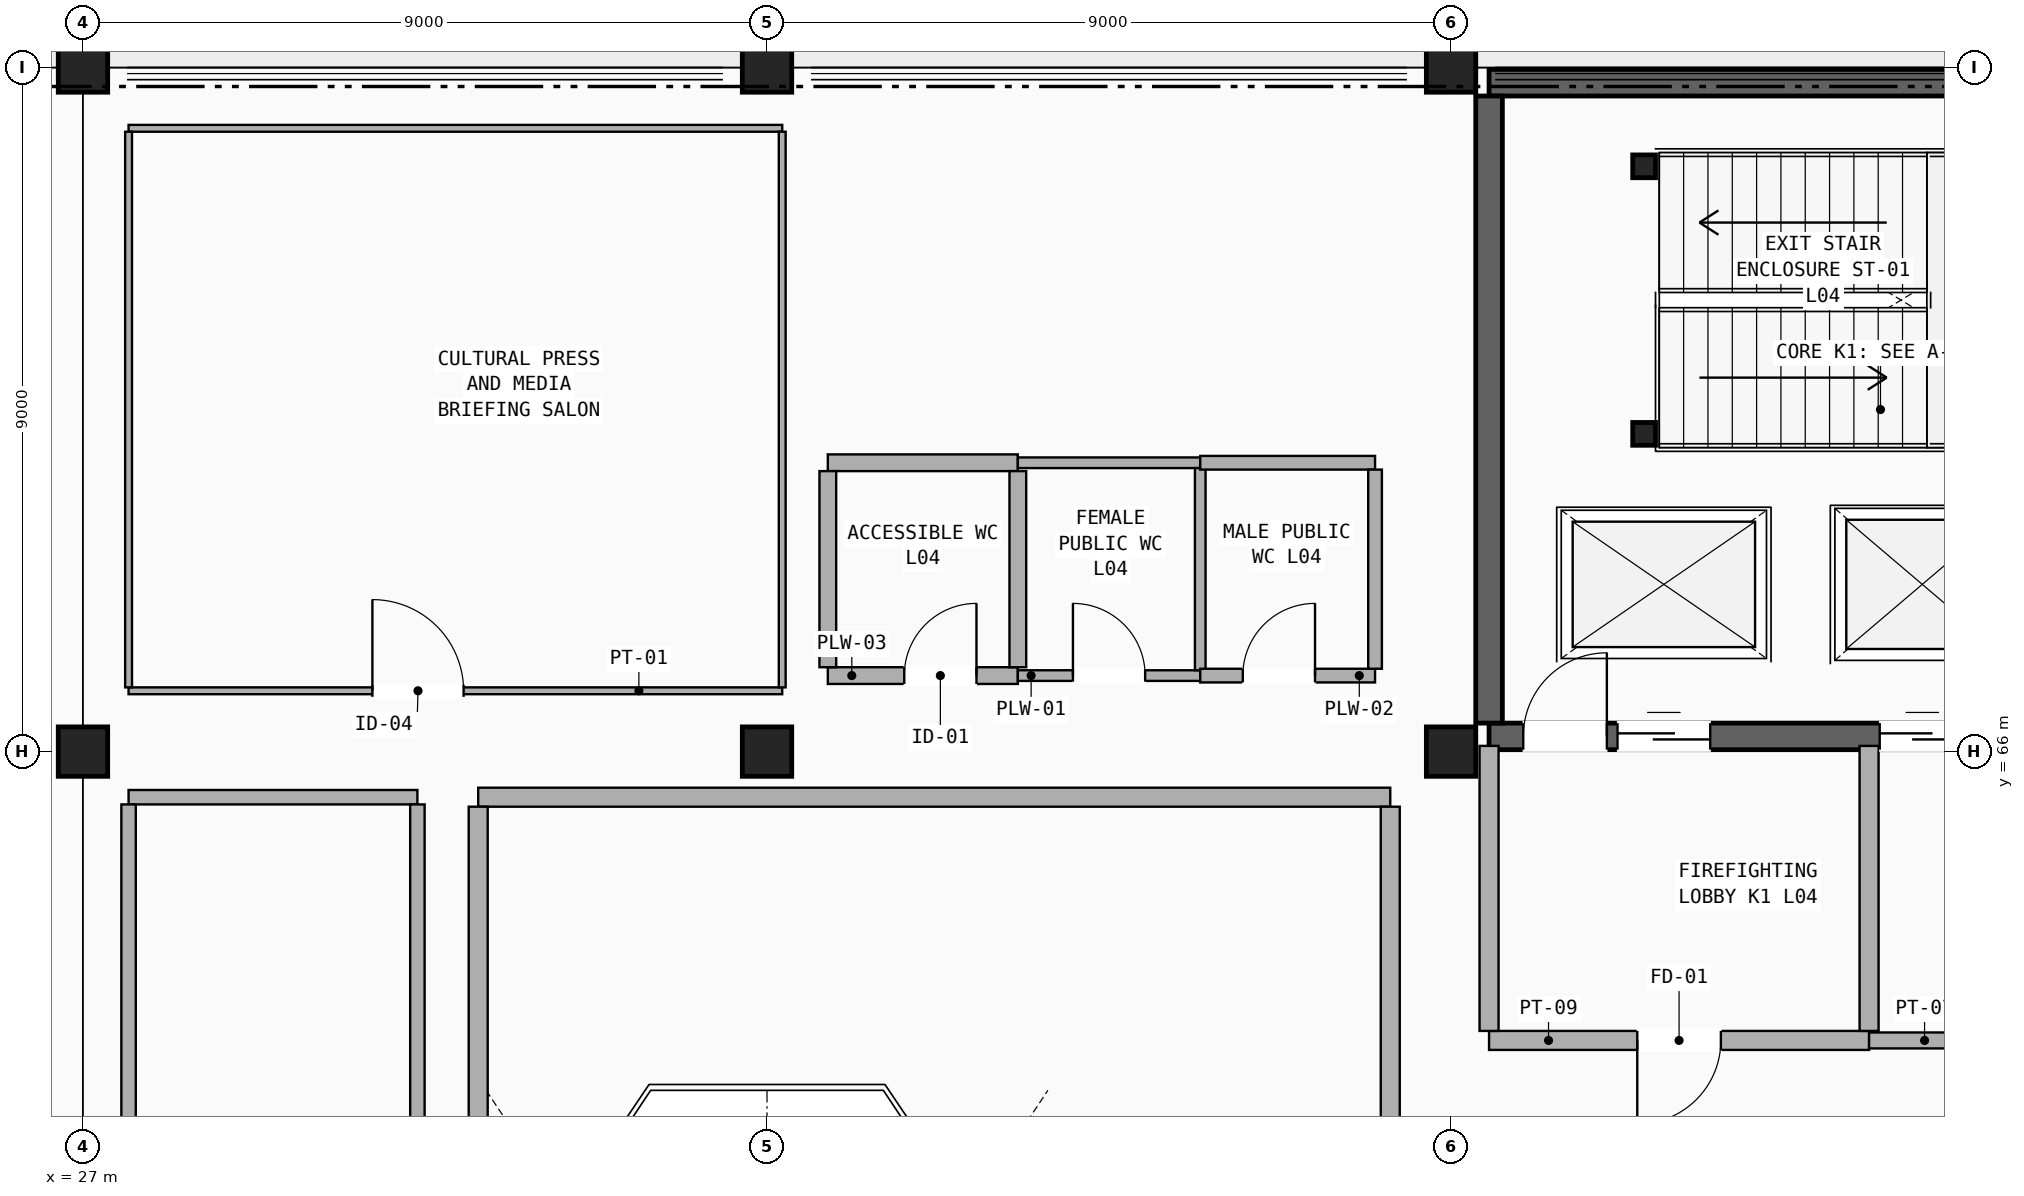
"""IFC4 building model, lengths in metres.
Left out: names, types, materials, properties, quantities, classifications, styles, units other than length and angle.
Written with IfcOpenShell. Run it as: python <this file> out.ifc"""

import sys

from ifc_helpers import new_model, si_unit, direction, frame, frame_2d, origin, origin_2d, place, context, subcontext, project, spatial, rectangle, hollow_rectangle, extrude, element, fill, save


model = new_model("IFC4")
c1 = context("Model", 3, precision=1e-05, world=origin(), true_north=direction((0.0, 1.0)))
c2 = subcontext(c1, "Body", "Model", "MODEL_VIEW")
j1 = project(units=[si_unit("LENGTHUNIT", "METRE"), si_unit("PLANEANGLEUNIT", "RADIAN")], contexts=[c1])
p1 = place(None, origin())
s1 = spatial("IfcSite", under=j1, at=p1, CompositionType="ELEMENT")
p2 = place(p1, origin())
s2 = spatial("IfcBuilding", under=s1, at=p2, CompositionType="ELEMENT")
p3 = place(p2, frame((0.0, 0.0, 17.68)))
s3 = spatial("IfcBuildingStorey", under=s2, at=p3, CompositionType="ELEMENT", Elevation=17.68)
for number, where, z_axis, x_axis in (
    (1, (27.0, 66.0, 0.0), (0.0, 0.0, 1.0), (1.0, 0.0, 0.0)),
    (2, (27.0, 75.0, 0.0), (0.0, 0.0, 1.0), (1.0, 0.0, 0.0)),
    (3, (36.0, 66.0, 0.0), (0.0, 0.0, 1.0), (1.0, 0.0, 0.0)),
    (4, (36.0, 75.0, 0.0), (0.0, 0.0, 1.0), (1.0, 0.0, 0.0)),
    (5, (45.0, 66.0, 0.0), (0.0, 0.0, 1.0), (1.0, 0.0, 0.0)),
    (6, (45.0, 75.0, 0.0), (0.0, 0.0, 1.0), (1.0, 0.0, 0.0)),
):
    element("IfcColumn", number, at=place(p3, frame(where, z_axis=z_axis, x_axis=x_axis)), inside=s3, PredefinedType="COLUMN", context=c2, shape_type="SweptSolid", body=[
        extrude(rectangle(XDim=0.65, YDim=0.65, at=origin_2d()), origin(), (0.0, 0.0, 1.0), 4.08),
    ])
p4 = place(p3, frame((45.5, 66.2, 0.0), z_axis=(0.0, 0.0, 1.0), x_axis=(1.0, 0.0, 0.0)))
e7 = element("IfcWall", 7, at=p4, inside=s3, PredefinedType="SHEAR", context=c2, shape_type="SweptSolid", body=[
    extrude(rectangle(XDim=10.3, YDim=0.35, at=frame_2d((5.15, 0.0))), origin(), (0.0, 0.0, 1.0), 4.08),
])
p5 = place(p4, frame((0.45, 0.0, 0.0)))
e8 = element("IfcOpeningElement", 8, at=p5, cuts=e7, PredefinedType="OPENING", context=c2, shape_type="SweptSolid", body=[
    extrude(rectangle(XDim=1.1, YDim=2.2, at=frame_2d((0.55, 1.1))), frame((0.0, 0.185, 0.0), z_axis=(0.0, -1.0, 0.0), x_axis=(1.0, 0.0, 0.0)), (0.0, 0.0, 1.0), 0.37),
])
p6 = place(p4, frame((1.69, 0.0, 0.0)))
e9 = element("IfcOpeningElement", 9, at=p6, cuts=e7, PredefinedType="OPENING", context=c2, shape_type="SweptSolid", body=[
    extrude(rectangle(XDim=1.22, YDim=2.2, at=frame_2d((0.61, 1.1))), frame((0.0, 0.185, 0.0), z_axis=(0.0, -1.0, 0.0), x_axis=(1.0, 0.0, 0.0)), (0.0, 0.0, 1.0), 0.37),
])
p7 = place(p4, frame((5.14, 0.0, 0.0)))
e10 = element("IfcOpeningElement", 10, at=p7, cuts=e7, PredefinedType="OPENING", context=c2, shape_type="SweptSolid", body=[
    extrude(rectangle(XDim=1.12, YDim=2.16, at=frame_2d((0.56, 1.08))), frame((0.0, 0.185, 0.0), z_axis=(0.0, -1.0, 0.0), x_axis=(1.0, 0.0, 0.0)), (0.0, 0.0, 1.0), 0.37),
])
p8 = place(p3, frame((45.5, 74.8, 0.0), z_axis=(0.0, 0.0, 1.0), x_axis=(1.0, 0.0, 0.0)))
e11 = element("IfcWall", 11, at=p8, inside=s3, PredefinedType="SHEAR", context=c2, shape_type="SweptSolid", body=[
    extrude(rectangle(XDim=10.3, YDim=0.35, at=frame_2d((5.15, 0.0))), origin(), (0.0, 0.0, 1.0), 4.08),
])
p9 = place(p3, frame((45.5, 66.375, 0.0), z_axis=(0.0, 0.0, 1.0), x_axis=(0.0, 1.0, 0.0)))
e12 = element("IfcWall", 12, at=p9, inside=s3, PredefinedType="SHEAR", context=c2, shape_type="SweptSolid", body=[
    extrude(rectangle(XDim=8.25, YDim=0.35, at=frame_2d((4.125, 0.0))), origin(), (0.0, 0.0, 1.0), 4.08),
])
for number, where, z_axis, x_axis in (
    (13, (47.54, 70.18, 0.0), (0.0, 0.0, 1.0), (1.0, 0.0, 0.0)),
    (14, (47.54, 73.7, 0.0), (0.0, 0.0, 1.0), (1.0, 0.0, 0.0)),
):
    element("IfcColumn", number, at=place(p3, frame(where, z_axis=z_axis, x_axis=x_axis)), inside=s3, PredefinedType="COLUMN", context=c2, shape_type="SweptSolid", body=[
        extrude(hollow_rectangle(XDim=0.3, YDim=0.3, WallThickness=0.016, InnerFilletRadius=0.016, OuterFilletRadius=0.032, at=origin_2d()), origin(), (0.0, 0.0, 1.0), 4.08),
    ])
p10 = place(p3, frame((45.5, 62.2, 0.0), z_axis=(0.0, 0.0, 1.0), x_axis=(1.0, 0.0, 0.0)))
e15 = element("IfcWall", 15, at=p10, inside=s3, PredefinedType="PARTITIONING", context=c2, shape_type="SweptSolid", body=[
    extrude(rectangle(XDim=5.0, YDim=0.25, at=frame_2d((2.5, 0.0))), origin(), (0.0, 0.0, 1.0), 3.84),
])
p11 = place(p10, frame((1.95, 0.0, 0.0)))
e16 = element("IfcOpeningElement", 16, at=p11, cuts=e15, PredefinedType="OPENING", context=c2, shape_type="SweptSolid", body=[
    extrude(rectangle(XDim=1.1, YDim=2.2, at=frame_2d((0.55, 1.1))), frame((0.0, 0.135, 0.0), z_axis=(0.0, -1.0, 0.0), x_axis=(1.0, 0.0, 0.0)), (0.0, 0.0, 1.0), 0.27),
])
for number, where, z_axis, x_axis in (
    (17, (45.5, 62.325, 0.0), (0.0, 0.0, 1.0), (0.0, 1.0, 0.0)),
    (18, (50.5, 62.325, 0.0), (0.0, 0.0, 1.0), (0.0, 1.0, 0.0)),
):
    element("IfcWall", number, at=place(p3, frame(where, z_axis=z_axis, x_axis=x_axis)), inside=s3, PredefinedType="PARTITIONING", context=c2, shape_type="SweptSolid", body=[
        extrude(rectangle(XDim=3.75, YDim=0.25, at=frame_2d((1.875, 0.0))), origin(), (0.0, 0.0, 1.0), 3.07),
    ])
p12 = place(p3, frame((50.5, 62.2, 0.0), z_axis=(0.0, 0.0, 1.0), x_axis=(1.0, 0.0, 0.0)))
e19 = element("IfcWall", 19, at=p12, inside=s3, PredefinedType="PARTITIONING", context=c2, shape_type="SweptSolid", body=[
    extrude(rectangle(XDim=5.3, YDim=0.21, at=frame_2d((2.65, 0.0))), origin(), (0.0, 0.0, 1.0), 2.97),
])
p13 = place(p12, frame((1.95, 0.0, 0.0)))
e20 = element("IfcOpeningElement", 20, at=p13, cuts=e19, PredefinedType="OPENING", context=c2, shape_type="SweptSolid", body=[
    extrude(rectangle(XDim=1.4, YDim=2.2, at=frame_2d((0.7, 1.1))), frame((0.0, 0.115, 0.0), z_axis=(0.0, -1.0, 0.0), x_axis=(1.0, 0.0, 0.0)), (0.0, 0.0, 1.0), 0.23),
])
p14 = place(p3, frame((36.8, 67.0, 0.0), z_axis=(0.0, 0.0, 1.0), x_axis=(1.0, 0.0, 0.0)))
e21 = element("IfcWall", 21, at=p14, inside=s3, PredefinedType="PLUMBINGWALL", context=c2, shape_type="SweptSolid", body=[
    extrude(rectangle(XDim=2.5, YDim=0.22, at=frame_2d((1.25, 0.0))), origin(), (0.0, 0.0, 1.0), 3.84),
])
p15 = place(p14, frame((1.006, 0.0, 0.0)))
e22 = element("IfcOpeningElement", 22, at=p15, cuts=e21, PredefinedType="OPENING", context=c2, shape_type="SweptSolid", body=[
    extrude(rectangle(XDim=0.95, YDim=2.15, at=frame_2d((0.475, 1.075))), frame((0.0, 0.12, 0.0), z_axis=(0.0, -1.0, 0.0), x_axis=(1.0, 0.0, 0.0)), (0.0, 0.0, 1.0), 0.24),
])
p16 = place(p3, frame((36.8, 69.8, 0.0), z_axis=(0.0, 0.0, 1.0), x_axis=(1.0, 0.0, 0.0)))
e23 = element("IfcWall", 23, at=p16, inside=s3, PredefinedType="PLUMBINGWALL", context=c2, shape_type="SweptSolid", body=[
    extrude(rectangle(XDim=2.5, YDim=0.22, at=frame_2d((1.25, 0.0))), origin(), (0.0, 0.0, 1.0), 3.84),
])
for number, where, z_axis, x_axis in (
    (24, (36.8, 67.11, 0.0), (0.0, 0.0, 1.0), (0.0, 1.0, 0.0)),
    (25, (39.3, 67.11, 0.0), (0.0, 0.0, 1.0), (0.0, 1.0, 0.0)),
):
    element("IfcWall", number, at=place(p3, frame(where, z_axis=z_axis, x_axis=x_axis)), inside=s3, PredefinedType="PLUMBINGWALL", context=c2, shape_type="SweptSolid", body=[
        extrude(rectangle(XDim=2.58, YDim=0.22, at=frame_2d((1.29, 0.0))), origin(), (0.0, 0.0, 1.0), 3.84),
    ])
p17 = place(p3, frame((39.3, 67.0, 0.0), z_axis=(0.0, 0.0, 1.0), x_axis=(1.0, 0.0, 0.0)))
e26 = element("IfcWall", 26, at=p17, inside=s3, PredefinedType="PLUMBINGWALL", context=c2, shape_type="SweptSolid", body=[
    extrude(rectangle(XDim=2.4, YDim=0.14, at=frame_2d((1.2, 0.0))), origin(), (0.0, 0.0, 1.0), 3.84),
])
p18 = place(p17, frame((0.725, 0.0, 0.0)))
e27 = element("IfcOpeningElement", 27, at=p18, cuts=e26, PredefinedType="OPENING", context=c2, shape_type="SweptSolid", body=[
    extrude(rectangle(XDim=0.95, YDim=2.15, at=frame_2d((0.475, 1.075))), frame((0.0, 0.08, 0.0), z_axis=(0.0, -1.0, 0.0), x_axis=(1.0, 0.0, 0.0)), (0.0, 0.0, 1.0), 0.16),
])
p19 = place(p3, frame((39.3, 69.8, 0.0), z_axis=(0.0, 0.0, 1.0), x_axis=(1.0, 0.0, 0.0)))
e28 = element("IfcWall", 28, at=p19, inside=s3, PredefinedType="PLUMBINGWALL", context=c2, shape_type="SweptSolid", body=[
    extrude(rectangle(XDim=2.4, YDim=0.14, at=frame_2d((1.2, 0.0))), origin(), (0.0, 0.0, 1.0), 3.84),
])
p20 = place(p3, frame((41.7, 67.07, 0.0), z_axis=(0.0, 0.0, 1.0), x_axis=(0.0, 1.0, 0.0)))
e29 = element("IfcWall", 29, at=p20, inside=s3, PredefinedType="PLUMBINGWALL", context=c2, shape_type="SweptSolid", body=[
    extrude(rectangle(XDim=2.66, YDim=0.14, at=frame_2d((1.33, 0.0))), origin(), (0.0, 0.0, 1.0), 3.84),
])
p21 = place(p3, frame((41.7, 67.0, 0.0), z_axis=(0.0, 0.0, 1.0), x_axis=(1.0, 0.0, 0.0)))
e30 = element("IfcWall", 30, at=p21, inside=s3, PredefinedType="PLUMBINGWALL", context=c2, shape_type="SweptSolid", body=[
    extrude(rectangle(XDim=2.3, YDim=0.18, at=frame_2d((1.15, 0.0))), origin(), (0.0, 0.0, 1.0), 3.84),
])
p22 = place(p21, frame((0.56, 0.0, 0.0)))
e31 = element("IfcOpeningElement", 31, at=p22, cuts=e30, PredefinedType="OPENING", context=c2, shape_type="SweptSolid", body=[
    extrude(rectangle(XDim=0.95, YDim=2.15, at=frame_2d((0.475, 1.075))), frame((0.0, 0.1, 0.0), z_axis=(0.0, -1.0, 0.0), x_axis=(1.0, 0.0, 0.0)), (0.0, 0.0, 1.0), 0.2),
])
p23 = place(p3, frame((41.7, 69.8, 0.0), z_axis=(0.0, 0.0, 1.0), x_axis=(1.0, 0.0, 0.0)))
e32 = element("IfcWall", 32, at=p23, inside=s3, PredefinedType="PLUMBINGWALL", context=c2, shape_type="SweptSolid", body=[
    extrude(rectangle(XDim=2.3, YDim=0.18, at=frame_2d((1.15, 0.0))), origin(), (0.0, 0.0, 1.0), 3.84),
])
p24 = place(p3, frame((44.0, 67.09, 0.0), z_axis=(0.0, 0.0, 1.0), x_axis=(0.0, 1.0, 0.0)))
e33 = element("IfcWall", 33, at=p24, inside=s3, PredefinedType="PLUMBINGWALL", context=c2, shape_type="SweptSolid", body=[
    extrude(rectangle(XDim=2.62, YDim=0.18, at=frame_2d((1.31, 0.0))), origin(), (0.0, 0.0, 1.0), 3.84),
])
p25 = place(p3, frame((27.6, 65.4, 0.0), z_axis=(0.0, 0.0, 1.0), x_axis=(1.0, 0.0, 0.0)))
e34 = element("IfcWall", 34, at=p25, inside=s3, PredefinedType="PARTITIONING", context=c2, shape_type="SweptSolid", body=[
    extrude(rectangle(XDim=3.8, YDim=0.19, at=frame_2d((1.9, 0.0))), origin(), (0.0, 0.0, 1.0), 3.84),
])
for number, where, z_axis, x_axis in (
    (35, (27.6, 46.695, 0.0), (0.0, 0.0, 1.0), (0.0, 1.0, 0.0)),
    (36, (31.4, 46.695, 0.0), (0.0, 0.0, 1.0), (0.0, 1.0, 0.0)),
):
    element("IfcWall", number, at=place(p3, frame(where, z_axis=z_axis, x_axis=x_axis)), inside=s3, PredefinedType="PARTITIONING", context=c2, shape_type="SweptSolid", body=[
        extrude(rectangle(XDim=18.61, YDim=0.19, at=frame_2d((9.305, 0.0))), origin(), (0.0, 0.0, 1.0), 2.82),
    ])
p26 = place(p3, frame((32.2, 65.4, 0.0), z_axis=(0.0, 0.0, 1.0), x_axis=(1.0, 0.0, 0.0)))
e37 = element("IfcWall", 37, at=p26, inside=s3, PredefinedType="PARTITIONING", context=c2, shape_type="SweptSolid", body=[
    extrude(rectangle(XDim=12.0, YDim=0.25, at=frame_2d((6.0, 0.0))), origin(), (0.0, 0.0, 1.0), 3.12),
])
p27 = place(p3, frame((32.2, 46.725, 0.0), z_axis=(0.0, 0.0, 1.0), x_axis=(0.0, 1.0, 0.0)))
e38 = element("IfcWall", 38, at=p27, inside=s3, PredefinedType="PARTITIONING", context=c2, shape_type="SweptSolid", body=[
    extrude(rectangle(XDim=18.55, YDim=0.25, at=frame_2d((9.275, 0.0))), origin(), (0.0, 0.0, 1.0), 2.82),
])
p28 = place(p3, frame((44.2, 46.725, 0.0), z_axis=(0.0, 0.0, 1.0), x_axis=(0.0, 1.0, 0.0)))
e39 = element("IfcWall", 39, at=p28, inside=s3, PredefinedType="PARTITIONING", context=c2, shape_type="SweptSolid", body=[
    extrude(rectangle(XDim=18.55, YDim=0.25, at=frame_2d((9.275, 0.0))), origin(), (0.0, 0.0, 1.0), 2.97),
])
p29 = place(p3, frame((27.6, 66.8, 0.0), z_axis=(0.0, 0.0, 1.0), x_axis=(1.0, 0.0, 0.0)))
e40 = element("IfcWall", 40, at=p29, inside=s3, PredefinedType="PARTITIONING", context=c2, shape_type="SweptSolid", body=[
    extrude(rectangle(XDim=8.6, YDim=0.09, at=frame_2d((4.3, 0.0))), origin(), (0.0, 0.0, 1.0), 3.14),
])
p30 = place(p29, frame((3.208, 0.0, 0.0)))
e41 = element("IfcOpeningElement", 41, at=p30, cuts=e40, PredefinedType="OPENING", context=c2, shape_type="SweptSolid", body=[
    extrude(rectangle(XDim=1.2, YDim=2.2, at=frame_2d((0.6, 1.1))), frame((0.0, 0.055, 0.0), z_axis=(0.0, -1.0, 0.0), x_axis=(1.0, 0.0, 0.0)), (0.0, 0.0, 1.0), 0.11),
])
p31 = place(p3, frame((27.6, 74.2, 0.0), z_axis=(0.0, 0.0, 1.0), x_axis=(1.0, 0.0, 0.0)))
e42 = element("IfcWall", 42, at=p31, inside=s3, PredefinedType="PARTITIONING", context=c2, shape_type="SweptSolid", body=[
    extrude(rectangle(XDim=8.6, YDim=0.09, at=frame_2d((4.3, 0.0))), origin(), (0.0, 0.0, 1.0), 3.14),
])
p32 = place(p3, frame((27.6, 66.845, 0.0), z_axis=(0.0, 0.0, 1.0), x_axis=(0.0, 1.0, 0.0)))
e43 = element("IfcWall", 43, at=p32, inside=s3, PredefinedType="PARTITIONING", context=c2, shape_type="SweptSolid", body=[
    extrude(rectangle(XDim=7.31, YDim=0.09, at=frame_2d((3.655, 0.0))), origin(), (0.0, 0.0, 1.0), 3.413),
])
p33 = place(p3, frame((36.2, 66.845, 0.0), z_axis=(0.0, 0.0, 1.0), x_axis=(0.0, 1.0, 0.0)))
e44 = element("IfcWall", 44, at=p33, inside=s3, PredefinedType="PARTITIONING", context=c2, shape_type="SweptSolid", body=[
    extrude(rectangle(XDim=7.31, YDim=0.09, at=frame_2d((3.655, 0.0))), origin(), (0.0, 0.0, 1.0), 3.14),
])
p34 = place(p5, origin())
e45 = element("IfcDoor", 45, at=p34, inside=s3, OperationType="SINGLE_SWING_RIGHT", PredefinedType="DOOR", context=c2, shape_type="SweptSolid", body=[
    extrude(rectangle(XDim=1.1, YDim=2.2, at=frame_2d((0.55, 1.1))), frame((0.0, 0.025, 0.0), z_axis=(0.0, -1.0, 0.0), x_axis=(1.0, 0.0, 0.0)), (0.0, 0.0, 1.0), 0.05),
])
fill(e8, e45)
p35 = place(p6, origin())
e46 = element("IfcDoor", 46, at=p35, inside=s3, OperationType="SLIDING_TO_LEFT", PredefinedType="DOOR", context=c2, shape_type="SweptSolid", body=[
    extrude(rectangle(XDim=1.22, YDim=2.2, at=frame_2d((0.61, 1.1))), frame((0.0, 0.025, 0.0), z_axis=(0.0, -1.0, 0.0), x_axis=(1.0, 0.0, 0.0)), (0.0, 0.0, 1.0), 0.05),
])
fill(e9, e46)
p36 = place(p7, origin())
e47 = element("IfcDoor", 47, at=p36, inside=s3, OperationType="SLIDING_TO_LEFT", PredefinedType="DOOR", context=c2, shape_type="SweptSolid", body=[
    extrude(rectangle(XDim=1.12, YDim=2.16, at=frame_2d((0.56, 1.08))), frame((0.0, 0.025, 0.0), z_axis=(0.0, -1.0, 0.0), x_axis=(1.0, 0.0, 0.0)), (0.0, 0.0, 1.0), 0.05),
])
fill(e10, e47)
p37 = place(p11, frame((1.1, 0.0, 0.0), z_axis=(0.0, 0.0, 1.0), x_axis=(-1.0, 0.0, 0.0)))
e48 = element("IfcDoor", 48, at=p37, inside=s3, OperationType="SINGLE_SWING_RIGHT", PredefinedType="DOOR", context=c2, shape_type="SweptSolid", body=[
    extrude(rectangle(XDim=1.1, YDim=2.2, at=frame_2d((0.55, 1.1))), frame((0.0, 0.025, 0.0), z_axis=(0.0, -1.0, 0.0), x_axis=(1.0, 0.0, 0.0)), (0.0, 0.0, 1.0), 0.05),
])
fill(e16, e48)
p38 = place(p15, origin())
e49 = element("IfcDoor", 49, at=p38, inside=s3, OperationType="SINGLE_SWING_RIGHT", PredefinedType="DOOR", context=c2, shape_type="SweptSolid", body=[
    extrude(rectangle(XDim=0.95, YDim=2.15, at=frame_2d((0.475, 1.075))), frame((0.0, 0.025, 0.0), z_axis=(0.0, -1.0, 0.0), x_axis=(1.0, 0.0, 0.0)), (0.0, 0.0, 1.0), 0.05),
])
fill(e22, e49)
p39 = place(p18, origin())
e50 = element("IfcDoor", 50, at=p39, inside=s3, OperationType="SINGLE_SWING_LEFT", PredefinedType="DOOR", context=c2, shape_type="SweptSolid", body=[
    extrude(rectangle(XDim=0.95, YDim=2.15, at=frame_2d((0.475, 1.075))), frame((0.0, 0.025, 0.0), z_axis=(0.0, -1.0, 0.0), x_axis=(1.0, 0.0, 0.0)), (0.0, 0.0, 1.0), 0.05),
])
fill(e27, e50)
p40 = place(p22, origin())
e51 = element("IfcDoor", 51, at=p40, inside=s3, OperationType="SINGLE_SWING_RIGHT", PredefinedType="DOOR", context=c2, shape_type="SweptSolid", body=[
    extrude(rectangle(XDim=0.95, YDim=2.15, at=frame_2d((0.475, 1.075))), frame((0.0, 0.025, 0.0), z_axis=(0.0, -1.0, 0.0), x_axis=(1.0, 0.0, 0.0)), (0.0, 0.0, 1.0), 0.05),
])
fill(e31, e51)
p41 = place(p30, origin())
e52 = element("IfcDoor", 52, at=p41, inside=s3, OperationType="SINGLE_SWING_LEFT", PredefinedType="DOOR", context=c2, shape_type="SweptSolid", body=[
    extrude(rectangle(XDim=1.2, YDim=2.2, at=frame_2d((0.6, 1.1))), frame((0.0, 0.025, 0.0), z_axis=(0.0, -1.0, 0.0), x_axis=(1.0, 0.0, 0.0)), (0.0, 0.0, 1.0), 0.05),
])
fill(e41, e52)
save(model, sys.argv[1])
